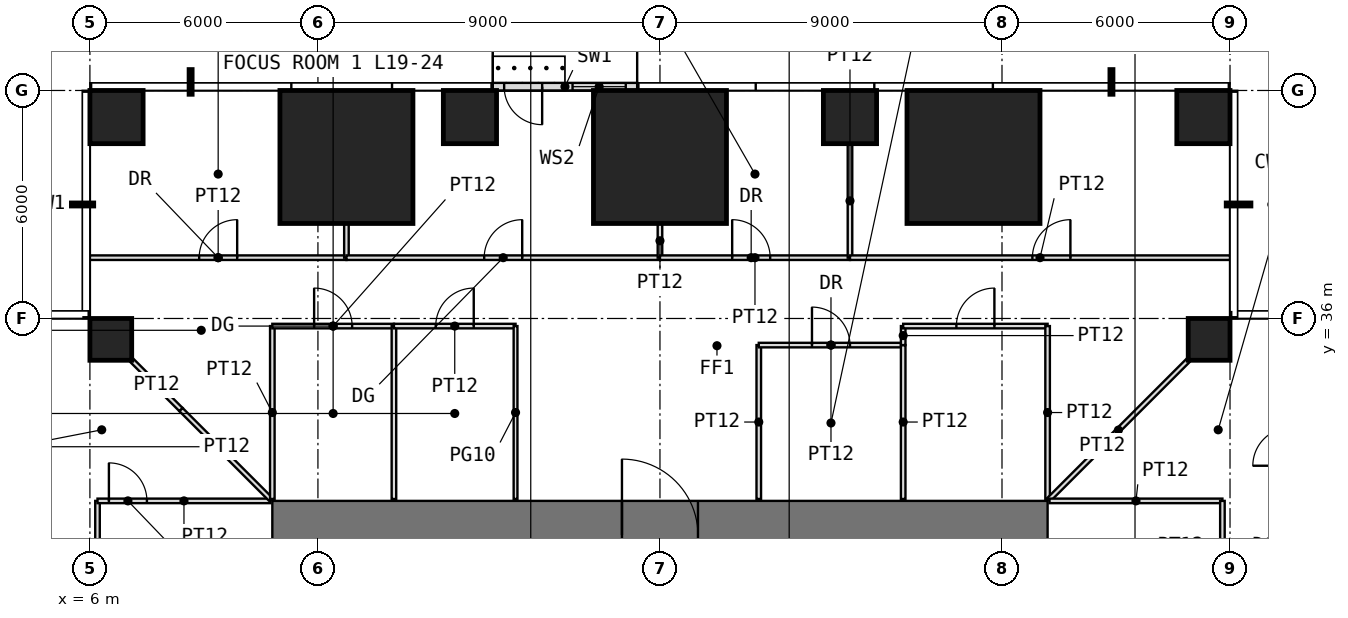
"""IFC4 building model, lengths in metres.
Left out: names, types, materials, properties, quantities, classifications, styles, units other than length and angle.
Written with IfcOpenShell. Run it as: python <this file> out.ifc"""

import sys

from ifc_helpers import new_model, si_unit, direction, frame, frame_2d, origin, origin_2d, place, context, subcontext, project, spatial, rectangle, extrude, element, fill, save


model = new_model("IFC4")
c1 = context("Model", 3, precision=1e-05, world=origin(), true_north=direction((0.0, 1.0)))
c2 = subcontext(c1, "Body", "Model", "MODEL_VIEW")
j1 = project(units=[si_unit("LENGTHUNIT", "METRE"), si_unit("PLANEANGLEUNIT", "RADIAN")], contexts=[c1])
p1 = place(None, origin())
s1 = spatial("IfcSite", under=j1, at=p1, CompositionType="ELEMENT")
p2 = place(p1, origin())
s2 = spatial("IfcBuilding", under=s1, at=p2, CompositionType="ELEMENT")
p3 = place(p2, frame((0.0, 0.0, 82.5)))
s3 = spatial("IfcBuildingStorey", under=s2, at=p3, CompositionType="ELEMENT", Elevation=82.5)
for number, where, z_axis, x_axis in (
    (1, (6.55, 35.45, 0.0), (0.0, 0.0, 1.0), (1.0, 0.0, 0.0)),
    (2, (35.45, 35.45, 0.0), (0.0, 0.0, 1.0), (1.0, 0.0, 0.0)),
):
    element("IfcColumn", number, at=place(p3, frame(where, z_axis=z_axis, x_axis=x_axis)), inside=s3, PredefinedType="COLUMN", context=c2, shape_type="SweptSolid", body=[
        extrude(rectangle(XDim=1.1, YDim=1.1, at=origin_2d()), origin(), (0.0, 0.0, 1.0), 4.0),
    ])
p4 = place(p3, frame((6.7, 41.3, 0.0), z_axis=(0.0, 0.0, 1.0), x_axis=(1.0, 0.0, 0.0)))
e3 = element("IfcColumn", 3, at=p4, inside=s3, PredefinedType="COLUMN", context=c2, shape_type="SweptSolid", body=[
    extrude(rectangle(XDim=1.4, YDim=1.4, at=origin_2d()), origin(), (0.0, 0.0, 1.0), 4.0),
])
p5 = place(p3, frame((12.75, 40.25, 0.0), z_axis=(0.0, 0.0, 1.0), x_axis=(1.0, 0.0, 0.0)))
e4 = element("IfcColumn", 4, at=p5, inside=s3, PredefinedType="COLUMN", context=c2, shape_type="SweptSolid", body=[
    extrude(rectangle(XDim=3.5, YDim=3.5, at=origin_2d()), origin(), (0.0, 0.0, 1.0), 4.0),
])
p6 = place(p3, frame((16.0, 41.3, 0.0), z_axis=(0.0, 0.0, 1.0), x_axis=(1.0, 0.0, 0.0)))
e5 = element("IfcColumn", 5, at=p6, inside=s3, PredefinedType="COLUMN", context=c2, shape_type="SweptSolid", body=[
    extrude(rectangle(XDim=1.4, YDim=1.4, at=origin_2d()), origin(), (0.0, 0.0, 1.0), 4.0),
])
p7 = place(p3, frame((21.0, 40.25, 0.0), z_axis=(0.0, 0.0, 1.0), x_axis=(1.0, 0.0, 0.0)))
e6 = element("IfcColumn", 6, at=p7, inside=s3, PredefinedType="COLUMN", context=c2, shape_type="SweptSolid", body=[
    extrude(rectangle(XDim=3.5, YDim=3.5, at=origin_2d()), origin(), (0.0, 0.0, 1.0), 4.0),
])
p8 = place(p3, frame((26.0, 41.3, 0.0), z_axis=(0.0, 0.0, 1.0), x_axis=(1.0, 0.0, 0.0)))
e7 = element("IfcColumn", 7, at=p8, inside=s3, PredefinedType="COLUMN", context=c2, shape_type="SweptSolid", body=[
    extrude(rectangle(XDim=1.4, YDim=1.4, at=origin_2d()), origin(), (0.0, 0.0, 1.0), 4.0),
])
p9 = place(p3, frame((29.25, 40.25, 0.0), z_axis=(0.0, 0.0, 1.0), x_axis=(1.0, 0.0, 0.0)))
e8 = element("IfcColumn", 8, at=p9, inside=s3, PredefinedType="COLUMN", context=c2, shape_type="SweptSolid", body=[
    extrude(rectangle(XDim=3.5, YDim=3.5, at=origin_2d()), origin(), (0.0, 0.0, 1.0), 4.0),
])
p10 = place(p3, frame((35.3, 41.3, 0.0), z_axis=(0.0, 0.0, 1.0), x_axis=(1.0, 0.0, 0.0)))
e9 = element("IfcColumn", 9, at=p10, inside=s3, PredefinedType="COLUMN", context=c2, shape_type="SweptSolid", body=[
    extrude(rectangle(XDim=1.4, YDim=1.4, at=origin_2d()), origin(), (0.0, 0.0, 1.0), 4.0),
])
p11 = place(p3, frame((20.4, 42.1, 0.0), z_axis=(0.0, 0.0, 1.0), x_axis=(-1.0, 0.0, 0.0)))
e10 = element("IfcWall", 10, at=p11, inside=s3, PredefinedType="USERDEFINED", context=c2, shape_type="SweptSolid", body=[
    extrude(rectangle(XDim=3.8, YDim=0.2, at=frame_2d((1.9, 0.0))), origin(), (0.0, 0.0, 1.0), 3.55),
])
p12 = place(p11, frame((2.5, 0.0, 0.0)))
e11 = element("IfcOpeningElement", 11, at=p12, cuts=e10, PredefinedType="OPENING", context=c2, shape_type="SweptSolid", body=[
    extrude(rectangle(XDim=1.0, YDim=2.4, at=frame_2d((0.5, 1.2))), frame((0.0, 0.11, 0.0), z_axis=(0.0, -1.0, 0.0), x_axis=(1.0, 0.0, 0.0)), (0.0, 0.0, 1.0), 0.22),
])
p13 = place(p11, frame((0.3, 0.0, 0.3)))
e12 = element("IfcOpeningElement", 12, at=p13, cuts=e10, PredefinedType="OPENING", context=c2, shape_type="SweptSolid", body=[
    extrude(rectangle(XDim=1.4, YDim=2.7, at=frame_2d((0.7, 1.35))), frame((0.0, 0.11, 0.0), z_axis=(0.0, -1.0, 0.0), x_axis=(1.0, 0.0, 0.0)), (0.0, 0.0, 1.0), 0.22),
])
p14 = place(p3, frame((10.8, 30.3, -0.05), z_axis=(0.0, 0.0, 1.0), x_axis=(1.0, 0.0, 0.0)))
e13 = element("IfcWall", 13, at=p14, inside=s3, PredefinedType="SHEAR", context=c2, shape_type="SweptSolid", body=[
    extrude(rectangle(XDim=20.4, YDim=1.8, at=frame_2d((10.2, 0.0))), origin(), (0.0, 0.0, 1.0), 3.8),
])
p15 = place(p14, frame((9.2, 0.0, 0.05)))
e14 = element("IfcOpeningElement", 14, at=p15, cuts=e13, PredefinedType="OPENING", context=c2, shape_type="SweptSolid", body=[
    extrude(rectangle(XDim=2.0, YDim=2.2, at=frame_2d((1.0, 1.1))), frame((0.0, 0.91, 0.0), z_axis=(0.0, -1.0, 0.0), x_axis=(1.0, 0.0, 0.0)), (0.0, 0.0, 1.0), 1.82),
])
p16 = place(p3, frame((6.0, 37.6, 0.0), z_axis=(0.0, 0.0, 1.0), x_axis=(1.0, 0.0, 0.0)))
e15 = element("IfcWall", 15, at=p16, inside=s3, PredefinedType="PARTITIONING", context=c2, shape_type="SweptSolid", body=[
    extrude(rectangle(XDim=6.75, YDim=0.12, at=frame_2d((3.375, 0.0))), origin(), (0.0, 0.0, 1.0), 3.55),
])
p17 = place(p16, frame((2.875, 0.0, 0.0)))
e16 = element("IfcOpeningElement", 16, at=p17, cuts=e15, PredefinedType="OPENING", context=c2, shape_type="SweptSolid", body=[
    extrude(rectangle(XDim=1.0, YDim=2.2, at=frame_2d((0.5, 1.1))), frame((0.0, 0.07, 0.0), z_axis=(0.0, -1.0, 0.0), x_axis=(1.0, 0.0, 0.0)), (0.0, 0.0, 1.0), 0.14),
])
p18 = place(p3, frame((6.2, 28.2, 0.0), z_axis=(0.0, 0.0, 1.0), x_axis=(0.0, 1.0, 0.0)))
e17 = element("IfcWall", 17, at=p18, inside=s3, PredefinedType="PARTITIONING", context=c2, shape_type="SweptSolid", body=[
    extrude(rectangle(XDim=3.0, YDim=0.12, at=frame_2d((1.5, 0.0))), origin(), (0.0, 0.0, 1.0), 3.55),
])
p19 = place(p3, frame((6.2, 31.2, 0.0), z_axis=(0.0, 0.0, 1.0), x_axis=(1.0, 0.0, 0.0)))
e18 = element("IfcWall", 18, at=p19, inside=s3, PredefinedType="PARTITIONING", context=c2, shape_type="SweptSolid", body=[
    extrude(rectangle(XDim=4.55, YDim=0.12, at=frame_2d((2.275, 0.0))), origin(), (0.0, 0.0, 1.0), 3.55),
])
p20 = place(p19, frame((0.3, 0.0, 0.0)))
e19 = element("IfcOpeningElement", 19, at=p20, cuts=e18, PredefinedType="OPENING", context=c2, shape_type="SweptSolid", body=[
    extrude(rectangle(XDim=1.0, YDim=2.4, at=frame_2d((0.5, 1.2))), frame((0.0, 0.07, 0.0), z_axis=(0.0, -1.0, 0.0), x_axis=(1.0, 0.0, 0.0)), (0.0, 0.0, 1.0), 0.14),
])
p21 = place(p3, frame((7.11, 34.89, 0.0), z_axis=(0.0, 0.0, 1.0), x_axis=(0.707106781187, -0.707106781187, 0.0)))
e20 = element("IfcWall", 20, at=p21, inside=s3, PredefinedType="PARTITIONING", context=c2, shape_type="SweptSolid", body=[
    extrude(rectangle(XDim=1.822, YDim=0.12, at=frame_2d((0.911, 0.0))), origin(), (0.0, 0.0, 1.0), 3.55),
])
p22 = place(p3, frame((8.398, 33.602, 0.0), z_axis=(0.0, 0.0, 1.0), x_axis=(0.707106781187, -0.707106781187, 0.0)))
e21 = element("IfcWall", 21, at=p22, inside=s3, PredefinedType="PARTITIONING", context=c2, shape_type="SweptSolid", body=[
    extrude(rectangle(XDim=3.346, YDim=0.12, at=frame_2d((1.673, 0.0))), origin(), (0.0, 0.0, 1.0), 3.55),
])
p23 = place(p3, frame((10.8, 31.25, 0.0), z_axis=(0.0, 0.0, 1.0), x_axis=(0.0, 1.0, 0.0)))
e22 = element("IfcWall", 22, at=p23, inside=s3, PredefinedType="PARTITIONING", context=c2, shape_type="SweptSolid", body=[
    extrude(rectangle(XDim=4.55, YDim=0.12, at=frame_2d((2.275, 0.0))), origin(), (0.0, 0.0, 1.0), 3.55),
])
p24 = place(p3, frame((10.8, 35.8, 0.0), z_axis=(0.0, 0.0, 1.0), x_axis=(1.0, 0.0, 0.0)))
e23 = element("IfcWall", 23, at=p24, inside=s3, PredefinedType="PARTITIONING", context=c2, shape_type="SweptSolid", body=[
    extrude(rectangle(XDim=3.2, YDim=0.12, at=frame_2d((1.6, 0.0))), origin(), (0.0, 0.0, 1.0), 3.55),
])
p25 = place(p24, frame((1.1, 0.0, 0.0)))
e24 = element("IfcOpeningElement", 24, at=p25, cuts=e23, PredefinedType="OPENING", context=c2, shape_type="SweptSolid", body=[
    extrude(rectangle(XDim=1.0, YDim=2.4, at=frame_2d((0.5, 1.2))), frame((0.0, 0.07, 0.0), z_axis=(0.0, -1.0, 0.0), x_axis=(1.0, 0.0, 0.0)), (0.0, 0.0, 1.0), 0.14),
])
p26 = place(p3, frame((12.75, 37.6, 0.0), z_axis=(0.0, 0.0, 1.0), x_axis=(0.0, 1.0, 0.0)))
e25 = element("IfcWall", 25, at=p26, inside=s3, PredefinedType="PARTITIONING", context=c2, shape_type="SweptSolid", body=[
    extrude(rectangle(XDim=0.89, YDim=0.12, at=frame_2d((0.445, 0.0))), origin(), (0.0, 0.0, 1.0), 3.55),
])
p27 = place(p3, frame((12.75, 37.6, 0.0), z_axis=(0.0, 0.0, 1.0), x_axis=(1.0, 0.0, 0.0)))
e26 = element("IfcWall", 26, at=p27, inside=s3, PredefinedType="PARTITIONING", context=c2, shape_type="SweptSolid", body=[
    extrude(rectangle(XDim=8.25, YDim=0.12, at=frame_2d((4.125, 0.0))), origin(), (0.0, 0.0, 1.0), 3.55),
])
p28 = place(p27, frame((3.625, 0.0, 0.0)))
e27 = element("IfcOpeningElement", 27, at=p28, cuts=e26, PredefinedType="OPENING", context=c2, shape_type="SweptSolid", body=[
    extrude(rectangle(XDim=1.0, YDim=2.4, at=frame_2d((0.5, 1.2))), frame((0.0, 0.07, 0.0), z_axis=(0.0, -1.0, 0.0), x_axis=(1.0, 0.0, 0.0)), (0.0, 0.0, 1.0), 0.14),
])
p29 = place(p3, frame((14.0, 31.25, 0.0), z_axis=(0.0, 0.0, 1.0), x_axis=(0.0, 1.0, 0.0)))
e28 = element("IfcWall", 28, at=p29, inside=s3, PredefinedType="PARTITIONING", context=c2, shape_type="SweptSolid", body=[
    extrude(rectangle(XDim=4.55, YDim=0.12, at=frame_2d((2.275, 0.0))), origin(), (0.0, 0.0, 1.0), 3.55),
])
p30 = place(p3, frame((14.0, 35.8, 0.0), z_axis=(0.0, 0.0, 1.0), x_axis=(1.0, 0.0, 0.0)))
e29 = element("IfcWall", 29, at=p30, inside=s3, PredefinedType="PARTITIONING", context=c2, shape_type="SweptSolid", body=[
    extrude(rectangle(XDim=3.2, YDim=0.12, at=frame_2d((1.6, 0.0))), origin(), (0.0, 0.0, 1.0), 3.55),
])
p31 = place(p30, frame((1.1, 0.0, 0.0)))
e30 = element("IfcOpeningElement", 30, at=p31, cuts=e29, PredefinedType="OPENING", context=c2, shape_type="SweptSolid", body=[
    extrude(rectangle(XDim=1.0, YDim=2.4, at=frame_2d((0.5, 1.2))), frame((0.0, 0.07, 0.0), z_axis=(0.0, -1.0, 0.0), x_axis=(1.0, 0.0, 0.0)), (0.0, 0.0, 1.0), 0.14),
])
p32 = place(p3, frame((17.2, 31.25, 0.0), z_axis=(0.0, 0.0, 1.0), x_axis=(0.0, 1.0, 0.0)))
e31 = element("IfcWall", 31, at=p32, inside=s3, PredefinedType="PARTITIONING", context=c2, shape_type="SweptSolid", body=[
    extrude(rectangle(XDim=4.55, YDim=0.1, at=frame_2d((2.275, 0.0))), origin(), (0.0, 0.0, 1.0), 3.55),
])
p33 = place(p3, frame((21.0, 37.6, 0.0), z_axis=(0.0, 0.0, 1.0), x_axis=(0.0, 1.0, 0.0)))
e32 = element("IfcWall", 32, at=p33, inside=s3, PredefinedType="PARTITIONING", context=c2, shape_type="SweptSolid", body=[
    extrude(rectangle(XDim=0.89, YDim=0.12, at=frame_2d((0.445, 0.0))), origin(), (0.0, 0.0, 1.0), 3.55),
])
p34 = place(p3, frame((21.0, 37.6, 0.0), z_axis=(0.0, 0.0, 1.0), x_axis=(1.0, 0.0, 0.0)))
e33 = element("IfcWall", 33, at=p34, inside=s3, PredefinedType="PARTITIONING", context=c2, shape_type="SweptSolid", body=[
    extrude(rectangle(XDim=5.0, YDim=0.12, at=frame_2d((2.5, 0.0))), origin(), (0.0, 0.0, 1.0), 3.55),
])
p35 = place(p34, frame((1.9, 0.0, 0.0)))
e34 = element("IfcOpeningElement", 34, at=p35, cuts=e33, PredefinedType="OPENING", context=c2, shape_type="SweptSolid", body=[
    extrude(rectangle(XDim=1.0, YDim=2.2, at=frame_2d((0.5, 1.1))), frame((0.0, 0.07, 0.0), z_axis=(0.0, -1.0, 0.0), x_axis=(1.0, 0.0, 0.0)), (0.0, 0.0, 1.0), 0.14),
])
p36 = place(p3, frame((23.6, 31.25, 0.0), z_axis=(0.0, 0.0, 1.0), x_axis=(0.0, 1.0, 0.0)))
e35 = element("IfcWall", 35, at=p36, inside=s3, PredefinedType="PARTITIONING", context=c2, shape_type="SweptSolid", body=[
    extrude(rectangle(XDim=4.05, YDim=0.12, at=frame_2d((2.025, 0.0))), origin(), (0.0, 0.0, 1.0), 3.55),
])
p37 = place(p3, frame((23.6, 35.3, 0.0), z_axis=(0.0, 0.0, 1.0), x_axis=(1.0, 0.0, 0.0)))
e36 = element("IfcWall", 36, at=p37, inside=s3, PredefinedType="PARTITIONING", context=c2, shape_type="SweptSolid", body=[
    extrude(rectangle(XDim=3.8, YDim=0.12, at=frame_2d((1.9, 0.0))), origin(), (0.0, 0.0, 1.0), 3.55),
])
p38 = place(p37, frame((1.4, 0.0, 0.0)))
e37 = element("IfcOpeningElement", 37, at=p38, cuts=e36, PredefinedType="OPENING", context=c2, shape_type="SweptSolid", body=[
    extrude(rectangle(XDim=1.0, YDim=2.2, at=frame_2d((0.5, 1.1))), frame((0.0, 0.07, 0.0), z_axis=(0.0, -1.0, 0.0), x_axis=(1.0, 0.0, 0.0)), (0.0, 0.0, 1.0), 0.14),
])
p39 = place(p3, frame((26.0, 37.6, 0.0), z_axis=(0.0, 0.0, 1.0), x_axis=(0.0, 1.0, 0.0)))
e38 = element("IfcWall", 38, at=p39, inside=s3, PredefinedType="PARTITIONING", context=c2, shape_type="SweptSolid", body=[
    extrude(rectangle(XDim=2.99, YDim=0.12, at=frame_2d((1.495, 0.0))), origin(), (0.0, 0.0, 1.0), 2.736),
])
p40 = place(p3, frame((26.0, 37.6, 0.0), z_axis=(0.0, 0.0, 1.0), x_axis=(1.0, 0.0, 0.0)))
e39 = element("IfcWall", 39, at=p40, inside=s3, PredefinedType="PARTITIONING", context=c2, shape_type="SweptSolid", body=[
    extrude(rectangle(XDim=10.0, YDim=0.12, at=frame_2d((5.0, 0.0))), origin(), (0.0, 0.0, 1.0), 3.55),
])
p41 = place(p40, frame((4.8, 0.0, 0.0)))
e40 = element("IfcOpeningElement", 40, at=p41, cuts=e39, PredefinedType="OPENING", context=c2, shape_type="SweptSolid", body=[
    extrude(rectangle(XDim=1.0, YDim=2.4, at=frame_2d((0.5, 1.2))), frame((0.0, 0.07, 0.0), z_axis=(0.0, -1.0, 0.0), x_axis=(1.0, 0.0, 0.0)), (0.0, 0.0, 1.0), 0.14),
])
p42 = place(p3, frame((27.4, 31.25, 0.0), z_axis=(0.0, 0.0, 1.0), x_axis=(0.0, 1.0, 0.0)))
e41 = element("IfcWall", 41, at=p42, inside=s3, PredefinedType="PARTITIONING", context=c2, shape_type="SweptSolid", body=[
    extrude(rectangle(XDim=4.05, YDim=0.12, at=frame_2d((2.025, 0.0))), origin(), (0.0, 0.0, 1.0), 3.55),
])
p43 = place(p3, frame((27.4, 35.3, 0.0), z_axis=(0.0, 0.0, 1.0), x_axis=(0.0, 1.0, 0.0)))
e42 = element("IfcWall", 42, at=p43, inside=s3, PredefinedType="PARTITIONING", context=c2, shape_type="SweptSolid", body=[
    extrude(rectangle(XDim=0.5, YDim=0.12, at=frame_2d((0.25, 0.0))), origin(), (0.0, 0.0, 1.0), 3.55),
])
p44 = place(p3, frame((27.4, 35.8, 0.0), z_axis=(0.0, 0.0, 1.0), x_axis=(1.0, 0.0, 0.0)))
e43 = element("IfcWall", 43, at=p44, inside=s3, PredefinedType="PARTITIONING", context=c2, shape_type="SweptSolid", body=[
    extrude(rectangle(XDim=3.8, YDim=0.12, at=frame_2d((1.9, 0.0))), origin(), (0.0, 0.0, 1.0), 3.55),
])
p45 = place(p44, frame((1.4, 0.0, 0.0)))
e44 = element("IfcOpeningElement", 44, at=p45, cuts=e43, PredefinedType="OPENING", context=c2, shape_type="SweptSolid", body=[
    extrude(rectangle(XDim=1.0, YDim=2.4, at=frame_2d((0.5, 1.2))), frame((0.0, 0.07, 0.0), z_axis=(0.0, -1.0, 0.0), x_axis=(1.0, 0.0, 0.0)), (0.0, 0.0, 1.0), 0.14),
])
p46 = place(p3, frame((31.2, 31.25, 0.0), z_axis=(0.0, 0.0, 1.0), x_axis=(0.0, 1.0, 0.0)))
e45 = element("IfcWall", 45, at=p46, inside=s3, PredefinedType="PARTITIONING", context=c2, shape_type="SweptSolid", body=[
    extrude(rectangle(XDim=4.55, YDim=0.12, at=frame_2d((2.275, 0.0))), origin(), (0.0, 0.0, 1.0), 3.55),
])
p47 = place(p3, frame((31.235, 31.235, 0.0), z_axis=(0.0, 0.0, 1.0), x_axis=(0.707106781187, 0.707106781187, 0.0)))
e46 = element("IfcWall", 46, at=p47, inside=s3, PredefinedType="PARTITIONING", context=c2, shape_type="SweptSolid", body=[
    extrude(rectangle(XDim=5.168, YDim=0.12, at=frame_2d((2.584, 0.0))), origin(), (0.0, 0.0, 1.0), 3.55),
])
p48 = place(p3, frame((31.25, 31.2, 0.0), z_axis=(0.0, 0.0, 1.0), x_axis=(1.0, 0.0, 0.0)))
e47 = element("IfcWall", 47, at=p48, inside=s3, PredefinedType="PARTITIONING", context=c2, shape_type="SweptSolid", body=[
    extrude(rectangle(XDim=4.55, YDim=0.12, at=frame_2d((2.275, 0.0))), origin(), (0.0, 0.0, 1.0), 3.55),
])
p49 = place(p3, frame((35.8, 25.0, 0.0), z_axis=(0.0, 0.0, 1.0), x_axis=(0.0, 1.0, 0.0)))
e48 = element("IfcWall", 48, at=p49, inside=s3, PredefinedType="PARTITIONING", context=c2, shape_type="SweptSolid", body=[
    extrude(rectangle(XDim=6.2, YDim=0.12, at=frame_2d((3.1, 0.0))), origin(), (0.0, 0.0, 1.0), 3.55),
])
p50 = place(p49, frame((2.6, 0.0, 0.0)))
e49 = element("IfcOpeningElement", 49, at=p50, cuts=e48, PredefinedType="OPENING", context=c2, shape_type="SweptSolid", body=[
    extrude(rectangle(XDim=1.0, YDim=2.4, at=frame_2d((0.5, 1.2))), frame((0.0, 0.07, 0.0), z_axis=(0.0, -1.0, 0.0), x_axis=(1.0, 0.0, 0.0)), (0.0, 0.0, 1.0), 0.14),
])
p51 = place(p12, origin())
e50 = element("IfcDoor", 50, at=p51, inside=s3, OperationType="SINGLE_SWING_LEFT", PredefinedType="DOOR", context=c2, shape_type="SweptSolid", body=[
    extrude(rectangle(XDim=1.0, YDim=2.4, at=frame_2d((0.5, 1.2))), frame((0.0, 0.025, 0.0), z_axis=(0.0, -1.0, 0.0), x_axis=(1.0, 0.0, 0.0)), (0.0, 0.0, 1.0), 0.05),
])
fill(e11, e50)
p52 = place(p13, origin())
e51 = element("IfcWindow", 51, at=p52, inside=s3, PartitioningType="SINGLE_PANEL", PredefinedType="WINDOW", context=c2, shape_type="SweptSolid", body=[
    extrude(rectangle(XDim=1.4, YDim=2.7, at=frame_2d((0.7, 1.35))), frame((0.0, 0.03, 0.0), z_axis=(0.0, -1.0, 0.0), x_axis=(1.0, 0.0, 0.0)), (0.0, 0.0, 1.0), 0.06),
])
fill(e12, e51)
p53 = place(p15, origin())
e52 = element("IfcDoor", 52, at=p53, inside=s3, OperationType="DOUBLE_DOOR_SINGLE_SWING", PredefinedType="DOOR", context=c2, shape_type="SweptSolid", body=[
    extrude(rectangle(XDim=2.0, YDim=2.2, at=frame_2d((1.0, 1.1))), frame((0.0, 0.025, 0.0), z_axis=(0.0, -1.0, 0.0), x_axis=(1.0, 0.0, 0.0)), (0.0, 0.0, 1.0), 0.05),
])
fill(e14, e52)
p54 = place(p25, origin())
e53 = element("IfcDoor", 53, at=p54, inside=s3, OperationType="SINGLE_SWING_LEFT", PredefinedType="DOOR", context=c2, shape_type="SweptSolid", body=[
    extrude(rectangle(XDim=1.0, YDim=2.4, at=frame_2d((0.5, 1.2))), frame((0.0, 0.025, 0.0), z_axis=(0.0, -1.0, 0.0), x_axis=(1.0, 0.0, 0.0)), (0.0, 0.0, 1.0), 0.05),
])
fill(e24, e53)
p55 = place(p31, origin())
e54 = element("IfcDoor", 54, at=p55, inside=s3, OperationType="SINGLE_SWING_RIGHT", PredefinedType="DOOR", context=c2, shape_type="SweptSolid", body=[
    extrude(rectangle(XDim=1.0, YDim=2.4, at=frame_2d((0.5, 1.2))), frame((0.0, 0.025, 0.0), z_axis=(0.0, -1.0, 0.0), x_axis=(1.0, 0.0, 0.0)), (0.0, 0.0, 1.0), 0.05),
])
fill(e30, e54)
p56 = place(p38, origin())
e55 = element("IfcDoor", 55, at=p56, inside=s3, OperationType="SINGLE_SWING_LEFT", PredefinedType="DOOR", context=c2, shape_type="SweptSolid", body=[
    extrude(rectangle(XDim=1.0, YDim=2.2, at=frame_2d((0.5, 1.1))), frame((0.0, 0.025, 0.0), z_axis=(0.0, -1.0, 0.0), x_axis=(1.0, 0.0, 0.0)), (0.0, 0.0, 1.0), 0.05),
])
fill(e37, e55)
p57 = place(p45, origin())
e56 = element("IfcDoor", 56, at=p57, inside=s3, OperationType="SINGLE_SWING_RIGHT", PredefinedType="DOOR", context=c2, shape_type="SweptSolid", body=[
    extrude(rectangle(XDim=1.0, YDim=2.4, at=frame_2d((0.5, 1.2))), frame((0.0, 0.025, 0.0), z_axis=(0.0, -1.0, 0.0), x_axis=(1.0, 0.0, 0.0)), (0.0, 0.0, 1.0), 0.05),
])
fill(e44, e56)
p58 = place(p17, origin())
e57 = element("IfcDoor", 57, at=p58, inside=s3, OperationType="SINGLE_SWING_RIGHT", PredefinedType="DOOR", context=c2, shape_type="SweptSolid", body=[
    extrude(rectangle(XDim=1.0, YDim=2.2, at=frame_2d((0.5, 1.1))), frame((0.0, 0.025, 0.0), z_axis=(0.0, -1.0, 0.0), x_axis=(1.0, 0.0, 0.0)), (0.0, 0.0, 1.0), 0.05),
])
fill(e16, e57)
p59 = place(p35, origin())
e58 = element("IfcDoor", 58, at=p59, inside=s3, OperationType="SINGLE_SWING_LEFT", PredefinedType="DOOR", context=c2, shape_type="SweptSolid", body=[
    extrude(rectangle(XDim=1.0, YDim=2.2, at=frame_2d((0.5, 1.1))), frame((0.0, 0.025, 0.0), z_axis=(0.0, -1.0, 0.0), x_axis=(1.0, 0.0, 0.0)), (0.0, 0.0, 1.0), 0.05),
])
fill(e34, e58)
p60 = place(p28, origin())
e59 = element("IfcDoor", 59, at=p60, inside=s3, OperationType="SINGLE_SWING_RIGHT", PredefinedType="DOOR", context=c2, shape_type="SweptSolid", body=[
    extrude(rectangle(XDim=1.0, YDim=2.4, at=frame_2d((0.5, 1.2))), frame((0.0, 0.025, 0.0), z_axis=(0.0, -1.0, 0.0), x_axis=(1.0, 0.0, 0.0)), (0.0, 0.0, 1.0), 0.05),
])
fill(e27, e59)
p61 = place(p41, origin())
e60 = element("IfcDoor", 60, at=p61, inside=s3, OperationType="SINGLE_SWING_RIGHT", PredefinedType="DOOR", context=c2, shape_type="SweptSolid", body=[
    extrude(rectangle(XDim=1.0, YDim=2.4, at=frame_2d((0.5, 1.2))), frame((0.0, 0.025, 0.0), z_axis=(0.0, -1.0, 0.0), x_axis=(1.0, 0.0, 0.0)), (0.0, 0.0, 1.0), 0.05),
])
fill(e40, e60)
p62 = place(p20, origin())
e61 = element("IfcDoor", 61, at=p62, inside=s3, OperationType="SINGLE_SWING_LEFT", PredefinedType="DOOR", context=c2, shape_type="SweptSolid", body=[
    extrude(rectangle(XDim=1.0, YDim=2.4, at=frame_2d((0.5, 1.2))), frame((0.0, 0.025, 0.0), z_axis=(0.0, -1.0, 0.0), x_axis=(1.0, 0.0, 0.0)), (0.0, 0.0, 1.0), 0.05),
])
fill(e19, e61)
save(model, sys.argv[1])
